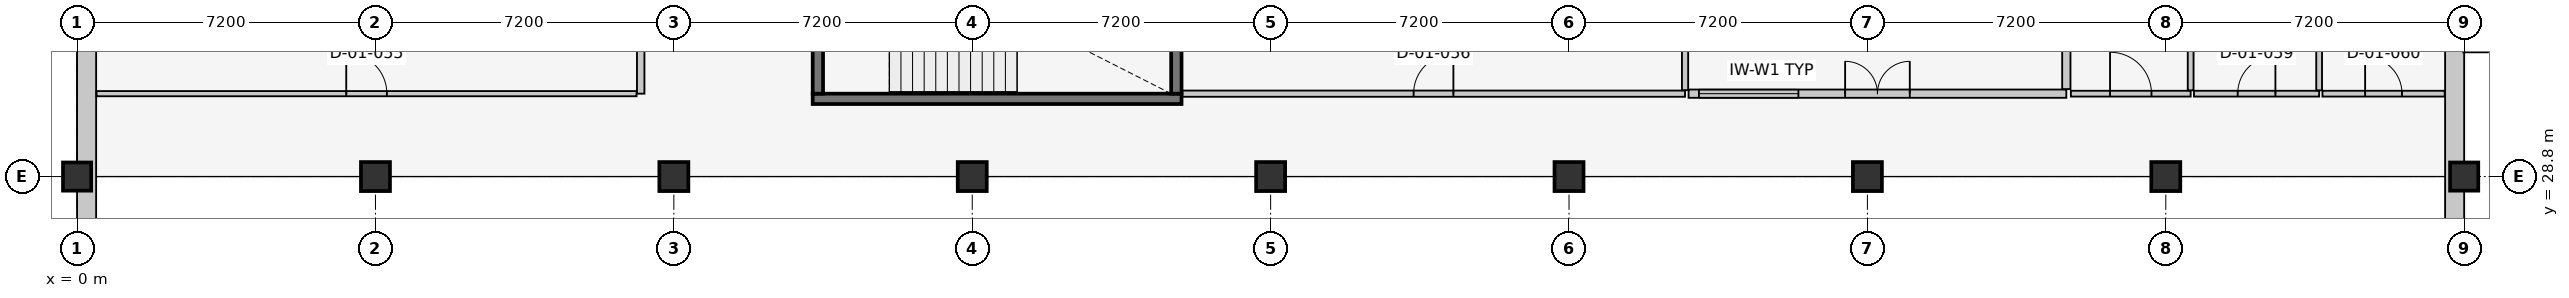
"""IFC4 building model, lengths in metres.
Left out: names, types, materials, properties, quantities, classifications, styles, units other than length and angle.
Written with IfcOpenShell. Run it as: python <this file> out.ifc"""

import sys

from ifc_helpers import new_model, si_unit, direction, frame, frame_2d, origin, origin_2d, place, context, subcontext, project, spatial, rectangle, extrude, element, fill, save


model = new_model("IFC4")
c1 = context("Model", 3, precision=1e-05, world=origin(), true_north=direction((0.0, 1.0)))
c2 = subcontext(c1, "Body", "Model", "MODEL_VIEW")
j1 = project(units=[si_unit("LENGTHUNIT", "METRE"), si_unit("PLANEANGLEUNIT", "RADIAN")], contexts=[c1])
p1 = place(None, origin())
s1 = spatial("IfcSite", under=j1, at=p1, CompositionType="ELEMENT")
p2 = place(p1, origin())
s2 = spatial("IfcBuilding", under=s1, at=p2, CompositionType="ELEMENT")
p3 = place(p2, frame((0.0, 0.0, 5.4)))
s3 = spatial("IfcBuildingStorey", under=s2, at=p3, CompositionType="ELEMENT", Elevation=5.4)
p4 = place(p3, frame((0.0, 28.8, 0.0), z_axis=(0.0, 0.0, 1.0), x_axis=(1.0, 0.0, 0.0)))
e1 = element("IfcColumn", 1, at=p4, inside=s3, PredefinedType="COLUMN", context=c2, shape_type="SweptSolid", body=[
    extrude(rectangle(XDim=0.68, YDim=0.68, at=origin_2d()), origin(), (0.0, 0.0, 1.0), 4.2),
])
for number, where, z_axis, x_axis in (
    (2, (7.2, 28.8, 0.0), (0.0, 0.0, 1.0), (1.0, 0.0, 0.0)),
    (3, (14.4, 28.8, 0.0), (0.0, 0.0, 1.0), (1.0, 0.0, 0.0)),
    (4, (21.6, 28.8, 0.0), (0.0, 0.0, 1.0), (1.0, 0.0, 0.0)),
    (5, (28.8, 28.8, 0.0), (0.0, 0.0, 1.0), (1.0, 0.0, 0.0)),
    (6, (36.0, 28.8, 0.0), (0.0, 0.0, 1.0), (1.0, 0.0, 0.0)),
    (7, (43.2, 28.8, 0.0), (0.0, 0.0, 1.0), (1.0, 0.0, 0.0)),
    (8, (50.4, 28.8, 0.0), (0.0, 0.0, 1.0), (1.0, 0.0, 0.0)),
):
    element("IfcColumn", number, at=place(p3, frame(where, z_axis=z_axis, x_axis=x_axis)), inside=s3, PredefinedType="COLUMN", context=c2, shape_type="SweptSolid", body=[
        extrude(rectangle(XDim=0.7, YDim=0.7, at=origin_2d()), origin(), (0.0, 0.0, 1.0), 4.2),
    ])
p5 = place(p3, frame((57.6, 28.8, 0.0), z_axis=(0.0, 0.0, 1.0), x_axis=(1.0, 0.0, 0.0)))
e9 = element("IfcColumn", 9, at=p5, inside=s3, PredefinedType="COLUMN", context=c2, shape_type="SweptSolid", body=[
    extrude(rectangle(XDim=0.68, YDim=0.68, at=origin_2d()), origin(), (0.0, 0.0, 1.0), 4.2),
])
p6 = place(p3, frame((57.37, 38.4, 0.0), z_axis=(0.0, 0.0, 1.0), x_axis=(0.0, -1.0, 0.0)))
e10 = element("IfcWall", 10, at=p6, inside=s3, PredefinedType="SOLIDWALL", context=c2, shape_type="SweptSolid", body=[
    extrude(rectangle(XDim=38.4, YDim=0.46, at=frame_2d((19.2, 0.0))), origin(), (0.0, 0.0, 1.0), 3.075),
])
p7 = place(p6, frame((1.3, 0.0, 0.9)))
e11 = element("IfcOpeningElement", 11, at=p7, cuts=e10, PredefinedType="OPENING", context=c2, shape_type="SweptSolid", body=[
    extrude(rectangle(XDim=1.24, YDim=1.75, at=frame_2d((0.62, 0.875))), frame((0.0, 0.242, 0.0), z_axis=(0.0, -1.0, 0.0), x_axis=(1.0, 0.0, 0.0)), (0.0, 0.0, 1.0), 0.484),
])
p8 = place(p6, frame((5.09, 0.0, 0.9)))
e12 = element("IfcOpeningElement", 12, at=p8, cuts=e10, PredefinedType="OPENING", context=c2, shape_type="SweptSolid", body=[
    extrude(rectangle(XDim=1.34, YDim=1.75, at=frame_2d((0.67, 0.875))), frame((0.0, 0.242, 0.0), z_axis=(0.0, -1.0, 0.0), x_axis=(1.0, 0.0, 0.0)), (0.0, 0.0, 1.0), 0.484),
])
p9 = place(p3, frame((0.23, 0.0, 0.0), z_axis=(0.0, 0.0, 1.0), x_axis=(0.0, 1.0, 0.0)))
e13 = element("IfcWall", 13, at=p9, inside=s3, PredefinedType="SOLIDWALL", context=c2, shape_type="SweptSolid", body=[
    extrude(rectangle(XDim=38.4, YDim=0.46, at=frame_2d((19.2, 0.0))), origin(), (0.0, 0.0, 1.0), 3.075),
])
p10 = place(p9, frame((32.065, 0.0, 0.9)))
e14 = element("IfcOpeningElement", 14, at=p10, cuts=e13, PredefinedType="OPENING", context=c2, shape_type="SweptSolid", body=[
    extrude(rectangle(XDim=1.15, YDim=1.6, at=frame_2d((0.575, 0.8))), frame((0.0, 0.242, 0.0), z_axis=(0.0, -1.0, 0.0), x_axis=(1.0, 0.0, 0.0)), (0.0, 0.0, 1.0), 0.484),
])
p11 = place(p9, frame((35.855, 0.0, 0.9)))
e15 = element("IfcOpeningElement", 15, at=p11, cuts=e13, PredefinedType="OPENING", context=c2, shape_type="SweptSolid", body=[
    extrude(rectangle(XDim=1.25, YDim=1.6, at=frame_2d((0.625, 0.8))), frame((0.0, 0.242, 0.0), z_axis=(0.0, -1.0, 0.0), x_axis=(1.0, 0.0, 0.0)), (0.0, 0.0, 1.0), 0.484),
])
p12 = place(p3, frame((17.75, 30.675, 0.0), z_axis=(0.0, 0.0, 1.0), x_axis=(1.0, 0.0, 0.0)))
e16 = element("IfcWall", 16, at=p12, inside=s3, PredefinedType="SHEAR", context=c2, shape_type="SweptSolid", body=[
    extrude(rectangle(XDim=8.9, YDim=0.25, at=frame_2d((4.45, 0.0))), origin(), (0.0, 0.0, 1.0), 3.92),
])
p13 = place(p3, frame((17.875, 34.25, 0.0), z_axis=(0.0, 0.0, 1.0), x_axis=(0.0, -1.0, 0.0)))
e17 = element("IfcWall", 17, at=p13, inside=s3, PredefinedType="SHEAR", context=c2, shape_type="SweptSolid", body=[
    extrude(rectangle(XDim=3.45, YDim=0.25, at=frame_2d((1.725, 0.0))), origin(), (0.0, 0.0, 1.0), 3.92),
])
p14 = place(p13, frame((1.125, 0.0, 0.0)))
e18 = element("IfcOpeningElement", 18, at=p14, cuts=e17, PredefinedType="OPENING", context=c2, shape_type="SweptSolid", body=[
    extrude(rectangle(XDim=1.2, YDim=2.15, at=frame_2d((0.6, 1.075))), frame((0.0, 0.137, 0.0), z_axis=(0.0, -1.0, 0.0), x_axis=(1.0, 0.0, 0.0)), (0.0, 0.0, 1.0), 0.274),
])
p15 = place(p3, frame((26.525, 30.8, 0.0), z_axis=(0.0, 0.0, 1.0), x_axis=(0.0, 1.0, 0.0)))
e19 = element("IfcWall", 19, at=p15, inside=s3, PredefinedType="SHEAR", context=c2, shape_type="SweptSolid", body=[
    extrude(rectangle(XDim=3.45, YDim=0.25, at=frame_2d((1.725, 0.0))), origin(), (0.0, 0.0, 1.0), 3.92),
])
p16 = place(p3, frame((13.6, 30.8, 0.0), z_axis=(0.0, 0.0, 1.0), x_axis=(0.0, 1.0, 0.0)))
e20 = element("IfcWall", 20, at=p16, inside=s3, PredefinedType="PARTITIONING", context=c2, shape_type="SweptSolid", body=[
    extrude(rectangle(XDim=7.13, YDim=0.18, at=frame_2d((3.565, 0.0))), origin(), (0.0, 0.0, 1.0), 3.92),
])
p17 = place(p3, frame((0.47, 30.8, 0.0), z_axis=(0.0, 0.0, 1.0), x_axis=(1.0, 0.0, 0.0)))
e21 = element("IfcWall", 21, at=p17, inside=s3, PredefinedType="PARTITIONING", context=c2, shape_type="SweptSolid", body=[
    extrude(rectangle(XDim=13.03, YDim=0.125, at=frame_2d((6.515, 0.0))), origin(), (0.0, 0.0, 1.0), 3.92),
])
p18 = place(p17, frame((6.025, 0.0, 0.0)))
e22 = element("IfcOpeningElement", 22, at=p18, cuts=e21, PredefinedType="OPENING", context=c2, shape_type="SweptSolid", body=[
    extrude(rectangle(XDim=0.98, YDim=2.12, at=frame_2d((0.49, 1.06))), frame((0.0, 0.074, 0.0), z_axis=(0.0, -1.0, 0.0), x_axis=(1.0, 0.0, 0.0)), (0.0, 0.0, 1.0), 0.149),
])
p19 = place(p3, frame((26.66, 30.8, 0.0), z_axis=(0.0, 0.0, 1.0), x_axis=(1.0, 0.0, 0.0)))
e23 = element("IfcWall", 23, at=p19, inside=s3, PredefinedType="PARTITIONING", context=c2, shape_type="SweptSolid", body=[
    extrude(rectangle(XDim=12.14, YDim=0.15, at=frame_2d((6.07, 0.0))), origin(), (0.0, 0.0, 1.0), 3.92),
])
p20 = place(p19, frame((5.59, 0.0, 0.0)))
e24 = element("IfcOpeningElement", 24, at=p20, cuts=e23, PredefinedType="OPENING", context=c2, shape_type="SweptSolid", body=[
    extrude(rectangle(XDim=0.96, YDim=2.1, at=frame_2d((0.48, 1.05))), frame((0.0, 0.087, 0.0), z_axis=(0.0, -1.0, 0.0), x_axis=(1.0, 0.0, 0.0)), (0.0, 0.0, 1.0), 0.174),
])
p21 = place(p3, frame((38.8, 30.885, 0.0), z_axis=(0.0, 0.0, 1.0), x_axis=(0.0, 1.0, 0.0)))
e25 = element("IfcWall", 25, at=p21, inside=s3, PredefinedType="PARTITIONING", context=c2, shape_type="SweptSolid", body=[
    extrude(rectangle(XDim=7.045, YDim=0.15, at=frame_2d((3.522, 0.0))), origin(), (0.0, 0.0, 1.0), 3.92),
])
p22 = place(p3, frame((38.885, 30.8, 0.0), z_axis=(0.0, 0.0, 1.0), x_axis=(1.0, 0.0, 0.0)))
e26 = element("IfcWall", 26, at=p22, inside=s3, PredefinedType="PARTITIONING", context=c2, shape_type="SweptSolid", body=[
    extrude(rectangle(XDim=9.115, YDim=0.2, at=frame_2d((4.558, 0.0))), origin(), (0.0, 0.0, 1.0), 3.92),
])
p23 = place(p22, frame((3.778, 0.0, 0.0)))
e27 = element("IfcOpeningElement", 27, at=p23, cuts=e26, PredefinedType="OPENING", context=c2, shape_type="SweptSolid", body=[
    extrude(rectangle(XDim=1.56, YDim=2.25, at=frame_2d((0.78, 1.125))), frame((0.0, 0.112, 0.0), z_axis=(0.0, -1.0, 0.0), x_axis=(1.0, 0.0, 0.0)), (0.0, 0.0, 1.0), 0.224),
])
p24 = place(p22, frame((0.25, 0.0, 1.0)))
e28 = element("IfcOpeningElement", 28, at=p24, cuts=e26, PredefinedType="OPENING", context=c2, shape_type="SweptSolid", body=[
    extrude(rectangle(XDim=2.4, YDim=1.25, at=frame_2d((1.2, 0.625))), frame((0.0, 0.112, 0.0), z_axis=(0.0, -1.0, 0.0), x_axis=(1.0, 0.0, 0.0)), (0.0, 0.0, 1.0), 0.224),
])
p25 = place(p3, frame((48.0, 30.91, 0.0), z_axis=(0.0, 0.0, 1.0), x_axis=(0.0, 1.0, 0.0)))
e29 = element("IfcWall", 29, at=p25, inside=s3, PredefinedType="PARTITIONING", context=c2, shape_type="SweptSolid", body=[
    extrude(rectangle(XDim=7.02, YDim=0.2, at=frame_2d((3.51, 0.0))), origin(), (0.0, 0.0, 1.0), 3.92),
])
p26 = place(p3, frame((48.11, 30.8, 0.0), z_axis=(0.0, 0.0, 1.0), x_axis=(1.0, 0.0, 0.0)))
e30 = element("IfcWall", 30, at=p26, inside=s3, PredefinedType="PARTITIONING", context=c2, shape_type="SweptSolid", body=[
    extrude(rectangle(XDim=2.89, YDim=0.14, at=frame_2d((1.445, 0.0))), origin(), (0.0, 0.0, 1.0), 3.92),
])
p27 = place(p26, frame((0.945, 0.0, 0.0)))
e31 = element("IfcOpeningElement", 31, at=p27, cuts=e30, PredefinedType="OPENING", context=c2, shape_type="SweptSolid", body=[
    extrude(rectangle(XDim=1.0, YDim=2.1, at=frame_2d((0.5, 1.05))), frame((0.0, 0.082, 0.0), z_axis=(0.0, -1.0, 0.0), x_axis=(1.0, 0.0, 0.0)), (0.0, 0.0, 1.0), 0.164),
])
p28 = place(p3, frame((51.0, 30.88, 0.0), z_axis=(0.0, 0.0, 1.0), x_axis=(0.0, 1.0, 0.0)))
e32 = element("IfcWall", 32, at=p28, inside=s3, PredefinedType="PARTITIONING", context=c2, shape_type="SweptSolid", body=[
    extrude(rectangle(XDim=7.05, YDim=0.14, at=frame_2d((3.525, 0.0))), origin(), (0.0, 0.0, 1.0), 3.92),
])
p29 = place(p3, frame((51.08, 30.8, 0.0), z_axis=(0.0, 0.0, 1.0), x_axis=(1.0, 0.0, 0.0)))
e33 = element("IfcWall", 33, at=p29, inside=s3, PredefinedType="PARTITIONING", context=c2, shape_type="SweptSolid", body=[
    extrude(rectangle(XDim=3.02, YDim=0.14, at=frame_2d((1.51, 0.0))), origin(), (0.0, 0.0, 1.0), 3.92),
])
p30 = place(p29, frame((1.055, 0.0, 0.0)))
e34 = element("IfcOpeningElement", 34, at=p30, cuts=e33, PredefinedType="OPENING", context=c2, shape_type="SweptSolid", body=[
    extrude(rectangle(XDim=0.91, YDim=2.06, at=frame_2d((0.455, 1.03))), frame((0.0, 0.082, 0.0), z_axis=(0.0, -1.0, 0.0), x_axis=(1.0, 0.0, 0.0)), (0.0, 0.0, 1.0), 0.164),
])
p31 = place(p3, frame((54.1, 30.88, 0.0), z_axis=(0.0, 0.0, 1.0), x_axis=(0.0, 1.0, 0.0)))
e35 = element("IfcWall", 35, at=p31, inside=s3, PredefinedType="PARTITIONING", context=c2, shape_type="SweptSolid", body=[
    extrude(rectangle(XDim=7.05, YDim=0.14, at=frame_2d((3.525, 0.0))), origin(), (0.0, 0.0, 1.0), 3.675),
])
p32 = place(p3, frame((54.18, 30.8, 0.0), z_axis=(0.0, 0.0, 1.0), x_axis=(1.0, 0.0, 0.0)))
e36 = element("IfcWall", 36, at=p32, inside=s3, PredefinedType="PARTITIONING", context=c2, shape_type="SweptSolid", body=[
    extrude(rectangle(XDim=2.95, YDim=0.14, at=frame_2d((1.475, 0.0))), origin(), (0.0, 0.0, 1.0), 3.92),
])
p33 = place(p32, frame((1.03, 0.0, 0.0)))
e37 = element("IfcOpeningElement", 37, at=p33, cuts=e36, PredefinedType="OPENING", context=c2, shape_type="SweptSolid", body=[
    extrude(rectangle(XDim=0.89, YDim=2.05, at=frame_2d((0.445, 1.025))), frame((0.0, 0.082, 0.0), z_axis=(0.0, -1.0, 0.0), x_axis=(1.0, 0.0, 0.0)), (0.0, 0.0, 1.0), 0.164),
])
p34 = place(p18, origin())
e38 = element("IfcDoor", 38, at=p34, inside=s3, OperationType="SINGLE_SWING_LEFT", PredefinedType="DOOR", context=c2, shape_type="SweptSolid", body=[
    extrude(rectangle(XDim=0.98, YDim=2.12, at=frame_2d((0.49, 1.06))), frame((0.0, 0.025, 0.0), z_axis=(0.0, -1.0, 0.0), x_axis=(1.0, 0.0, 0.0)), (0.0, 0.0, 1.0), 0.05),
])
fill(e22, e38)
p35 = place(p20, origin())
e39 = element("IfcDoor", 39, at=p35, inside=s3, OperationType="SINGLE_SWING_RIGHT", PredefinedType="DOOR", context=c2, shape_type="SweptSolid", body=[
    extrude(rectangle(XDim=0.96, YDim=2.1, at=frame_2d((0.48, 1.05))), frame((0.0, 0.025, 0.0), z_axis=(0.0, -1.0, 0.0), x_axis=(1.0, 0.0, 0.0)), (0.0, 0.0, 1.0), 0.05),
])
fill(e24, e39)
p36 = place(p23, origin())
e40 = element("IfcDoor", 40, at=p36, inside=s3, OperationType="DOUBLE_DOOR_SINGLE_SWING", PredefinedType="DOOR", context=c2, shape_type="SweptSolid", body=[
    extrude(rectangle(XDim=1.56, YDim=2.25, at=frame_2d((0.78, 1.125))), frame((0.0, 0.025, 0.0), z_axis=(0.0, -1.0, 0.0), x_axis=(1.0, 0.0, 0.0)), (0.0, 0.0, 1.0), 0.05),
])
fill(e27, e40)
p37 = place(p24, origin())
e41 = element("IfcWindow", 41, at=p37, inside=s3, PartitioningType="SINGLE_PANEL", PredefinedType="WINDOW", context=c2, shape_type="SweptSolid", body=[
    extrude(rectangle(XDim=2.4, YDim=1.25, at=frame_2d((1.2, 0.625))), frame((0.0, 0.03, 0.0), z_axis=(0.0, -1.0, 0.0), x_axis=(1.0, 0.0, 0.0)), (0.0, 0.0, 1.0), 0.06),
])
fill(e28, e41)
p38 = place(p27, origin())
e42 = element("IfcDoor", 42, at=p38, inside=s3, OperationType="SINGLE_SWING_LEFT", PredefinedType="DOOR", context=c2, shape_type="SweptSolid", body=[
    extrude(rectangle(XDim=1.0, YDim=2.1, at=frame_2d((0.5, 1.05))), frame((0.0, 0.025, 0.0), z_axis=(0.0, -1.0, 0.0), x_axis=(1.0, 0.0, 0.0)), (0.0, 0.0, 1.0), 0.05),
])
fill(e31, e42)
p39 = place(p30, origin())
e43 = element("IfcDoor", 43, at=p39, inside=s3, OperationType="SINGLE_SWING_RIGHT", PredefinedType="DOOR", context=c2, shape_type="SweptSolid", body=[
    extrude(rectangle(XDim=0.91, YDim=2.06, at=frame_2d((0.455, 1.03))), frame((0.0, 0.025, 0.0), z_axis=(0.0, -1.0, 0.0), x_axis=(1.0, 0.0, 0.0)), (0.0, 0.0, 1.0), 0.05),
])
fill(e34, e43)
p40 = place(p33, origin())
e44 = element("IfcDoor", 44, at=p40, inside=s3, OperationType="SINGLE_SWING_LEFT", PredefinedType="DOOR", context=c2, shape_type="SweptSolid", body=[
    extrude(rectangle(XDim=0.89, YDim=2.05, at=frame_2d((0.445, 1.025))), frame((0.0, 0.025, 0.0), z_axis=(0.0, -1.0, 0.0), x_axis=(1.0, 0.0, 0.0)), (0.0, 0.0, 1.0), 0.05),
])
fill(e37, e44)
save(model, sys.argv[1])
